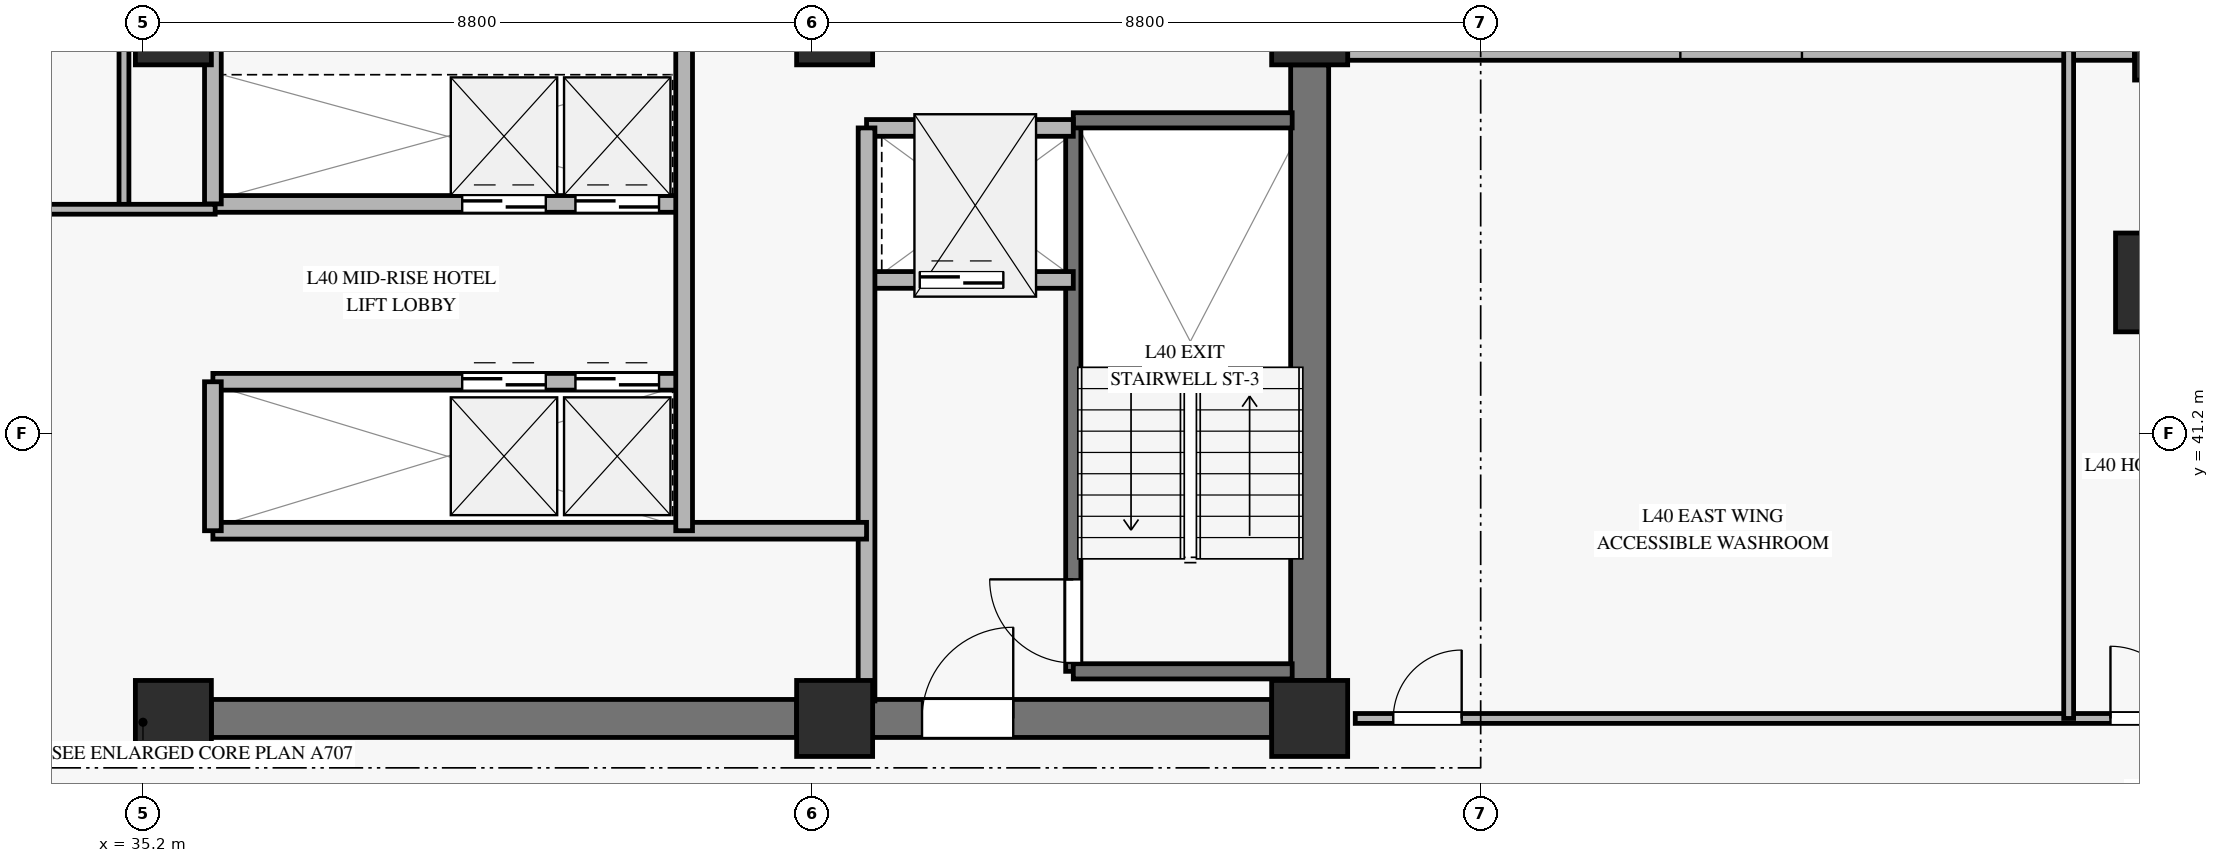
"""IFC4 building model, lengths in metres.
Left out: names, types, materials, properties, quantities, classifications, styles, units other than length and angle.
Written with IfcOpenShell. Run it as: python <this file> out.ifc"""

import sys

from ifc_helpers import new_model, si_unit, direction, frame, frame_2d, origin, origin_2d, place, context, subcontext, project, spatial, rectangle, hollow_rectangle, extrude, source, transform, mapped, element, fill, save


model = new_model("IFC4")
c1 = context("Model", 3, precision=1e-05, world=origin(), true_north=direction((0.0, 1.0)))
c2 = subcontext(c1, "Body", "Model", "MODEL_VIEW")
j1 = project(units=[si_unit("LENGTHUNIT", "METRE"), si_unit("PLANEANGLEUNIT", "RADIAN")], contexts=[c1])
p1 = place(None, origin())
s1 = spatial("IfcSite", under=j1, at=p1, CompositionType="ELEMENT")
p2 = place(p1, origin())
s2 = spatial("IfcBuilding", under=s1, at=p2, CompositionType="ELEMENT")
p3 = place(p2, frame((0.0, 0.0, 163.2)))
s3 = spatial("IfcBuildingStorey", under=s2, at=p3, CompositionType="ELEMENT", Elevation=163.2)
m1 = source(origin(), c2, "Body", "SweptSolid", [
    extrude(rectangle(XDim=1.0, YDim=1.0, at=origin_2d()), origin(), (0.0, 0.0, 1.0), 3.27),
])
for number, where, z_axis, x_axis in (
    (1, (35.6, 37.45, 0.0), (0.0, 0.0, 1.0), (1.0, 0.0, 0.0)),
    (2, (35.6, 46.55, 0.0), (0.0, 0.0, 1.0), (1.0, 0.0, 0.0)),
    (3, (44.3, 37.45, 0.0), (0.0, 0.0, 1.0), (1.0, 0.0, 0.0)),
    (4, (44.3, 46.55, 0.0), (0.0, 0.0, 1.0), (1.0, 0.0, 0.0)),
    (5, (50.55, 37.45, 0.0), (0.0, 0.0, 1.0), (1.0, 0.0, 0.0)),
    (6, (50.55, 46.55, 0.0), (0.0, 0.0, 1.0), (1.0, 0.0, 0.0)),
):
    element("IfcColumn", number, at=place(p3, frame(where, z_axis=z_axis, x_axis=x_axis)), inside=s3, PredefinedType="PILASTER", context=c2, shape_type="MappedRepresentation", body=[
        mapped(m1, transform((0.0, 0.0, 0.0), x_axis=(1.0, 0.0, 0.0), y_axis=(0.0, 1.0, 0.0), z_axis=(0.0, 0.0, 1.0), scale=1.0)),
    ])
p4 = place(p3, frame((36.1, 37.45, 0.0), z_axis=(0.0, 0.0, 1.0), x_axis=(1.0, 0.0, 0.0)))
e7 = element("IfcWall", 7, at=p4, inside=s3, PredefinedType="SHEAR", context=c2, shape_type="SweptSolid", body=[
    extrude(rectangle(XDim=7.7, YDim=0.5, at=frame_2d((3.85, 0.0))), origin(), (0.0, 0.0, 1.0), 3.27),
])
p5 = place(p3, frame((44.8, 37.45, 0.0), z_axis=(0.0, 0.0, 1.0), x_axis=(1.0, 0.0, 0.0)))
e8 = element("IfcWall", 8, at=p5, inside=s3, PredefinedType="SHEAR", context=c2, shape_type="SweptSolid", body=[
    extrude(rectangle(XDim=5.25, YDim=0.5, at=frame_2d((2.625, 0.0))), origin(), (0.0, 0.0, 1.0), 3.27),
])
p6 = place(p5, frame((0.65, 0.0, 0.0)))
e9 = element("IfcOpeningElement", 9, at=p6, cuts=e8, PredefinedType="OPENING", context=c2, shape_type="SweptSolid", body=[
    extrude(rectangle(XDim=1.2, YDim=2.15, at=frame_2d((0.6, 1.075))), frame((0.0, 0.26, 0.0), z_axis=(0.0, -1.0, 0.0), x_axis=(1.0, 0.0, 0.0)), (0.0, 0.0, 1.0), 0.52),
])
p7 = place(p3, frame((50.55, 37.95, 0.0), z_axis=(0.0, 0.0, 1.0), x_axis=(0.0, 1.0, 0.0)))
e10 = element("IfcWall", 10, at=p7, inside=s3, PredefinedType="SHEAR", context=c2, shape_type="SweptSolid", body=[
    extrude(rectangle(XDim=8.1, YDim=0.5, at=frame_2d((4.05, 0.0))), origin(), (0.0, 0.0, 1.0), 3.27),
])
m2 = source(origin(), c2, "Body", "SweptSolid", [
    extrude(hollow_rectangle(XDim=1.3, YDim=1.3, WallThickness=0.06, at=origin_2d()), origin(), (0.0, 0.0, 1.0), 3.27),
])
p8 = place(p3, frame((61.803, 43.187, 0.0), z_axis=(0.0, 0.0, 1.0), x_axis=(1.0, 0.0, 0.0)))
e11 = element("IfcColumn", 11, at=p8, inside=s3, PredefinedType="COLUMN", context=c2, shape_type="MappedRepresentation", body=[
    mapped(m2, transform((0.0, 0.0, 0.0), x_axis=(1.0, 0.0, 0.0), y_axis=(0.0, 1.0, 0.0), z_axis=(0.0, 0.0, 1.0), scale=1.0)),
])
m3 = source(origin(), c2, "Body", "SweptSolid", [
    extrude(hollow_rectangle(XDim=0.8, YDim=0.8, WallThickness=0.036, at=origin_2d()), origin(), (0.0, 0.0, 1.0), 3.27),
])
p9 = place(p3, frame((61.803, 46.25, 0.0), z_axis=(0.0, 0.0, 1.0), x_axis=(1.0, 0.0, 0.0)))
e12 = element("IfcColumn", 12, at=p9, inside=s3, PredefinedType="COLUMN", context=c2, shape_type="MappedRepresentation", body=[
    mapped(m3, transform((0.0, 0.0, 0.0), x_axis=(1.0, 0.0, 0.0), y_axis=(0.0, 1.0, 0.0), z_axis=(0.0, 0.0, 1.0), scale=1.0)),
])
p10 = place(p3, frame((51.05, 46.25, 0.0), z_axis=(0.0, 0.0, 1.0), x_axis=(1.0, 0.0, 0.0)))
e13 = element("IfcWall", 13, at=p10, inside=s3, PredefinedType="SOLIDWALL", context=c2, shape_type="SweptSolid", body=[
    extrude(rectangle(XDim=10.353, YDim=0.28, at=frame_2d((5.177, 0.0))), origin(), (0.0, 0.0, 1.0), 2.75),
])
p11 = place(p10, frame((4.377, 0.0, 0.45)))
e14 = element("IfcOpeningElement", 14, at=p11, cuts=e13, PredefinedType="OPENING", context=c2, shape_type="SweptSolid", body=[
    extrude(rectangle(XDim=1.6, YDim=2.0, at=frame_2d((0.8, 1.0))), frame((0.0, 0.15, 0.0), z_axis=(0.0, -1.0, 0.0), x_axis=(1.0, 0.0, 0.0)), (0.0, 0.0, 1.0), 0.3),
])
p12 = place(p3, frame((47.44, 38.07, 0.0), z_axis=(0.0, 0.0, 1.0), x_axis=(0.0, 1.0, 0.0)))
e15 = element("IfcWall", 15, at=p12, inside=s3, PredefinedType="SOLIDWALL", context=c2, shape_type="SweptSolid", body=[
    extrude(rectangle(XDim=7.25, YDim=0.2, at=frame_2d((3.625, 0.0))), origin(), (0.0, 0.0, 1.0), 3.5),
])
p13 = place(p12, frame((0.11, 0.0, 0.0)))
e16 = element("IfcOpeningElement", 16, at=p13, cuts=e15, PredefinedType="OPENING", context=c2, shape_type="SweptSolid", body=[
    extrude(rectangle(XDim=1.1, YDim=2.15, at=frame_2d((0.55, 1.075))), frame((0.0, 0.11, 0.0), z_axis=(0.0, -1.0, 0.0), x_axis=(1.0, 0.0, 0.0)), (0.0, 0.0, 1.0), 0.22),
])
for number, where, z_axis, x_axis in (
    (17, (47.44, 45.32, 0.0), (0.0, 0.0, 1.0), (1.0, 0.0, 0.0)),
    (18, (47.44, 38.07, 0.0), (0.0, 0.0, 1.0), (1.0, 0.0, 0.0)),
):
    element("IfcWall", number, at=place(p3, frame(where, z_axis=z_axis, x_axis=x_axis)), inside=s3, PredefinedType="SOLIDWALL", context=c2, shape_type="SweptSolid", body=[
        extrude(rectangle(XDim=2.88, YDim=0.2, at=frame_2d((1.44, 0.0))), origin(), (0.0, 0.0, 1.0), 3.5),
    ])
p14 = place(p3, frame((44.72, 43.22, 0.0), z_axis=(0.0, 0.0, 1.0), x_axis=(1.0, 0.0, 0.0)))
e19 = element("IfcWall", 19, at=p14, inside=s3, PredefinedType="SOLIDWALL", context=c2, shape_type="SweptSolid", body=[
    extrude(rectangle(XDim=2.72, YDim=0.22, at=frame_2d((1.36, 0.0))), origin(), (0.0, 0.0, 1.0), 3.27),
])
p15 = place(p14, frame((0.7, 0.0, 0.0)))
e20 = element("IfcOpeningElement", 20, at=p15, cuts=e19, PredefinedType="OPENING", context=c2, shape_type="SweptSolid", body=[
    extrude(rectangle(XDim=1.1, YDim=2.2, at=frame_2d((0.55, 1.1))), frame((0.0, 0.12, 0.0), z_axis=(0.0, -1.0, 0.0), x_axis=(1.0, 0.0, 0.0)), (0.0, 0.0, 1.0), 0.24),
])
p16 = place(p3, frame((44.72, 45.22, 0.0), z_axis=(0.0, 0.0, 1.0), x_axis=(1.0, 0.0, 0.0)))
e21 = element("IfcWall", 21, at=p16, inside=s3, PredefinedType="SOLIDWALL", context=c2, shape_type="SweptSolid", body=[
    extrude(rectangle(XDim=2.72, YDim=0.22, at=frame_2d((1.36, 0.0))), origin(), (0.0, 0.0, 1.0), 3.27),
])
p17 = place(p3, frame((44.72, 37.68, 0.0), z_axis=(0.0, 0.0, 1.0), x_axis=(0.0, 1.0, 0.0)))
e22 = element("IfcWall", 22, at=p17, inside=s3, PredefinedType="SOLIDWALL", context=c2, shape_type="SweptSolid", body=[
    extrude(rectangle(XDim=7.54, YDim=0.22, at=frame_2d((3.77, 0.0))), origin(), (0.0, 0.0, 1.0), 3.27),
])
p18 = place(p3, frame((36.12, 44.22, 0.0), z_axis=(0.0, 0.0, 1.0), x_axis=(1.0, 0.0, 0.0)))
e23 = element("IfcWall", 23, at=p18, inside=s3, PredefinedType="SOLIDWALL", context=c2, shape_type="SweptSolid", body=[
    extrude(rectangle(XDim=6.2, YDim=0.22, at=frame_2d((3.1, 0.0))), origin(), (0.0, 0.0, 1.0), 3.27),
])
p19 = place(p18, frame((3.28, 0.0, 0.0)))
e24 = element("IfcOpeningElement", 24, at=p19, cuts=e23, PredefinedType="OPENING", context=c2, shape_type="SweptSolid", body=[
    extrude(rectangle(XDim=1.1, YDim=2.2, at=frame_2d((0.55, 1.1))), frame((0.0, 0.12, 0.0), z_axis=(0.0, -1.0, 0.0), x_axis=(1.0, 0.0, 0.0)), (0.0, 0.0, 1.0), 0.24),
])
p20 = place(p18, frame((4.77, 0.0, 0.0)))
e25 = element("IfcOpeningElement", 25, at=p20, cuts=e23, PredefinedType="OPENING", context=c2, shape_type="SweptSolid", body=[
    extrude(rectangle(XDim=1.1, YDim=2.2, at=frame_2d((0.55, 1.1))), frame((0.0, 0.12, 0.0), z_axis=(0.0, -1.0, 0.0), x_axis=(1.0, 0.0, 0.0)), (0.0, 0.0, 1.0), 0.24),
])
p21 = place(p3, frame((36.12, 41.88, 0.0), z_axis=(0.0, 0.0, 1.0), x_axis=(1.0, 0.0, 0.0)))
e26 = element("IfcWall", 26, at=p21, inside=s3, PredefinedType="SOLIDWALL", context=c2, shape_type="SweptSolid", body=[
    extrude(rectangle(XDim=6.2, YDim=0.22, at=frame_2d((3.1, 0.0))), origin(), (0.0, 0.0, 1.0), 3.27),
])
p22 = place(p21, frame((3.28, 0.0, 0.0)))
e27 = element("IfcOpeningElement", 27, at=p22, cuts=e26, PredefinedType="OPENING", context=c2, shape_type="SweptSolid", body=[
    extrude(rectangle(XDim=1.1, YDim=2.2, at=frame_2d((0.55, 1.1))), frame((0.0, 0.12, 0.0), z_axis=(0.0, -1.0, 0.0), x_axis=(1.0, 0.0, 0.0)), (0.0, 0.0, 1.0), 0.24),
])
p23 = place(p21, frame((4.77, 0.0, 0.0)))
e28 = element("IfcOpeningElement", 28, at=p23, cuts=e26, PredefinedType="OPENING", context=c2, shape_type="SweptSolid", body=[
    extrude(rectangle(XDim=1.1, YDim=2.2, at=frame_2d((0.55, 1.1))), frame((0.0, 0.12, 0.0), z_axis=(0.0, -1.0, 0.0), x_axis=(1.0, 0.0, 0.0)), (0.0, 0.0, 1.0), 0.24),
])
p24 = place(p3, frame((36.12, 39.92, 0.0), z_axis=(0.0, 0.0, 1.0), x_axis=(1.0, 0.0, 0.0)))
e29 = element("IfcWall", 29, at=p24, inside=s3, PredefinedType="SOLIDWALL", context=c2, shape_type="SweptSolid", body=[
    extrude(rectangle(XDim=8.6, YDim=0.22, at=frame_2d((4.3, 0.0))), origin(), (0.0, 0.0, 1.0), 2.555),
])
p25 = place(p3, frame((42.32, 39.92, 0.0), z_axis=(0.0, 0.0, 1.0), x_axis=(0.0, 1.0, 0.0)))
e30 = element("IfcWall", 30, at=p25, inside=s3, PredefinedType="SOLIDWALL", context=c2, shape_type="SweptSolid", body=[
    extrude(rectangle(XDim=6.4, YDim=0.22, at=frame_2d((3.2, 0.0))), origin(), (0.0, 0.0, 1.0), 3.27),
])
p26 = place(p3, frame((36.12, 39.92, 0.0), z_axis=(0.0, 0.0, 1.0), x_axis=(0.0, 1.0, 0.0)))
e31 = element("IfcWall", 31, at=p26, inside=s3, PredefinedType="SOLIDWALL", context=c2, shape_type="SweptSolid", body=[
    extrude(rectangle(XDim=1.96, YDim=0.22, at=frame_2d((0.98, 0.0))), origin(), (0.0, 0.0, 1.0), 3.27),
])
p27 = place(p3, frame((36.12, 44.22, 0.0), z_axis=(0.0, 0.0, 1.0), x_axis=(0.0, 1.0, 0.0)))
e32 = element("IfcWall", 32, at=p27, inside=s3, PredefinedType="SOLIDWALL", context=c2, shape_type="SweptSolid", body=[
    extrude(rectangle(XDim=2.1, YDim=0.22, at=frame_2d((1.05, 0.0))), origin(), (0.0, 0.0, 1.0), 3.27),
])
p28 = place(p3, frame((34.95, 44.15, 0.0), z_axis=(0.0, 0.0, 1.0), x_axis=(0.0, 1.0, 0.0)))
e33 = element("IfcWall", 33, at=p28, inside=s3, PredefinedType="PARTITIONING", context=c2, shape_type="SweptSolid", body=[
    extrude(rectangle(XDim=2.17, YDim=0.13, at=frame_2d((1.085, 0.0))), origin(), (0.0, 0.0, 1.0), 3.27),
])
p29 = place(p3, frame((33.18, 44.15, 0.0), z_axis=(0.0, 0.0, 1.0), x_axis=(1.0, 0.0, 0.0)))
e34 = element("IfcWall", 34, at=p29, inside=s3, PredefinedType="PARTITIONING", context=c2, shape_type="SweptSolid", body=[
    extrude(rectangle(XDim=2.97, YDim=0.13, at=frame_2d((1.485, 0.0))), origin(), (0.0, 0.0, 1.0), 2.555),
])
p30 = place(p3, frame((51.15, 37.45, 0.0), z_axis=(0.0, 0.0, 1.0), x_axis=(1.0, 0.0, 0.0)))
e35 = element("IfcWall", 35, at=p30, inside=s3, PredefinedType="PARTITIONING", context=c2, shape_type="SweptSolid", body=[
    extrude(rectangle(XDim=13.566, YDim=0.13, at=frame_2d((6.783, 0.0))), origin(), (0.0, 0.0, 1.0), 2.755),
])
p31 = place(p30, frame((0.5, 0.0, 0.0)))
e36 = element("IfcOpeningElement", 36, at=p31, cuts=e35, PredefinedType="OPENING", context=c2, shape_type="SweptSolid", body=[
    extrude(rectangle(XDim=0.9, YDim=2.1, at=frame_2d((0.45, 1.05))), frame((0.0, 0.075, 0.0), z_axis=(0.0, -1.0, 0.0), x_axis=(1.0, 0.0, 0.0)), (0.0, 0.0, 1.0), 0.15),
])
p32 = place(p30, frame((9.936, 0.0, 0.0)))
e37 = element("IfcOpeningElement", 37, at=p32, cuts=e35, PredefinedType="OPENING", context=c2, shape_type="SweptSolid", body=[
    extrude(rectangle(XDim=0.95, YDim=2.1, at=frame_2d((0.475, 1.05))), frame((0.0, 0.075, 0.0), z_axis=(0.0, -1.0, 0.0), x_axis=(1.0, 0.0, 0.0)), (0.0, 0.0, 1.0), 0.15),
])
p33 = place(p3, frame((60.536, 37.45, 0.0), z_axis=(0.0, 0.0, 1.0), x_axis=(0.0, 1.0, 0.0)))
e38 = element("IfcWall", 38, at=p33, inside=s3, PredefinedType="PARTITIONING", context=c2, shape_type="SweptSolid", body=[
    extrude(rectangle(XDim=8.8, YDim=0.13, at=frame_2d((4.4, 0.0))), origin(), (0.0, 0.0, 1.0), 3.27),
])
m4 = source(origin(), c2, "Body", "SweptSolid", [
    extrude(rectangle(XDim=1.1, YDim=2.15, at=frame_2d((0.55, 1.075))), frame((0.0, 0.025, 0.0), z_axis=(0.0, -1.0, 0.0), x_axis=(1.0, 0.0, 0.0)), (0.0, 0.0, 1.0), 0.05),
])
p34 = place(p13, origin())
e39 = element("IfcDoor", 39, at=p34, inside=s3, OperationType="SINGLE_SWING_RIGHT", PredefinedType="DOOR", context=c2, shape_type="MappedRepresentation", body=[
    mapped(m4, transform((0.0, 0.0, 0.0), x_axis=(1.0, 0.0, 0.0), y_axis=(0.0, 1.0, 0.0), z_axis=(0.0, 0.0, 1.0), scale=1.0)),
])
fill(e16, e39)
m5 = source(origin(), c2, "Body", "SweptSolid", [
    extrude(rectangle(XDim=1.1, YDim=2.2, at=frame_2d((0.55, 1.1))), frame((0.0, 0.025, 0.0), z_axis=(0.0, -1.0, 0.0), x_axis=(1.0, 0.0, 0.0)), (0.0, 0.0, 1.0), 0.05),
])
p35 = place(p15, origin())
e40 = element("IfcDoor", 40, at=p35, inside=s3, OperationType="SLIDING_TO_LEFT", PredefinedType="DOOR", context=c2, shape_type="MappedRepresentation", body=[
    mapped(m5, transform((0.0, 0.0, 0.0), x_axis=(1.0, 0.0, 0.0), y_axis=(0.0, 1.0, 0.0), z_axis=(0.0, 0.0, 1.0), scale=1.0)),
])
fill(e20, e40)
m6 = source(origin(), c2, "Body", "SweptSolid", [
    extrude(rectangle(XDim=1.2, YDim=2.15, at=frame_2d((0.6, 1.075))), frame((0.0, 0.025, 0.0), z_axis=(0.0, -1.0, 0.0), x_axis=(1.0, 0.0, 0.0)), (0.0, 0.0, 1.0), 0.05),
])
p36 = place(p6, origin())
e41 = element("IfcDoor", 41, at=p36, inside=s3, OperationType="SINGLE_SWING_RIGHT", PredefinedType="DOOR", context=c2, shape_type="MappedRepresentation", body=[
    mapped(m6, transform((0.0, 0.0, 0.0), x_axis=(1.0, 0.0, 0.0), y_axis=(0.0, 1.0, 0.0), z_axis=(0.0, 0.0, 1.0), scale=1.0)),
])
fill(e9, e41)
p37 = place(p19, origin())
e42 = element("IfcDoor", 42, at=p37, inside=s3, OperationType="SLIDING_TO_LEFT", PredefinedType="DOOR", context=c2, shape_type="MappedRepresentation", body=[
    mapped(m5, transform((0.0, 0.0, 0.0), x_axis=(1.0, 0.0, 0.0), y_axis=(0.0, 1.0, 0.0), z_axis=(0.0, 0.0, 1.0), scale=1.0)),
])
fill(e24, e42)
p38 = place(p20, origin())
e43 = element("IfcDoor", 43, at=p38, inside=s3, OperationType="SLIDING_TO_LEFT", PredefinedType="DOOR", context=c2, shape_type="MappedRepresentation", body=[
    mapped(m5, transform((0.0, 0.0, 0.0), x_axis=(1.0, 0.0, 0.0), y_axis=(0.0, 1.0, 0.0), z_axis=(0.0, 0.0, 1.0), scale=1.0)),
])
fill(e25, e43)
p39 = place(p22, origin())
e44 = element("IfcDoor", 44, at=p39, inside=s3, OperationType="SLIDING_TO_LEFT", PredefinedType="DOOR", context=c2, shape_type="MappedRepresentation", body=[
    mapped(m5, transform((0.0, 0.0, 0.0), x_axis=(1.0, 0.0, 0.0), y_axis=(0.0, 1.0, 0.0), z_axis=(0.0, 0.0, 1.0), scale=1.0)),
])
fill(e27, e44)
p40 = place(p23, origin())
e45 = element("IfcDoor", 45, at=p40, inside=s3, OperationType="SLIDING_TO_LEFT", PredefinedType="DOOR", context=c2, shape_type="MappedRepresentation", body=[
    mapped(m5, transform((0.0, 0.0, 0.0), x_axis=(1.0, 0.0, 0.0), y_axis=(0.0, 1.0, 0.0), z_axis=(0.0, 0.0, 1.0), scale=1.0)),
])
fill(e28, e45)
m7 = source(origin(), c2, "Body", "SweptSolid", [
    extrude(rectangle(XDim=0.9, YDim=2.1, at=frame_2d((0.45, 1.05))), frame((0.0, 0.025, 0.0), z_axis=(0.0, -1.0, 0.0), x_axis=(1.0, 0.0, 0.0)), (0.0, 0.0, 1.0), 0.05),
])
p41 = place(p31, origin())
e46 = element("IfcDoor", 46, at=p41, inside=s3, OperationType="SINGLE_SWING_RIGHT", PredefinedType="DOOR", context=c2, shape_type="MappedRepresentation", body=[
    mapped(m7, transform((0.0, 0.0, 0.0), x_axis=(1.0, 0.0, 0.0), y_axis=(0.0, 1.0, 0.0), z_axis=(0.0, 0.0, 1.0), scale=1.0)),
])
fill(e36, e46)
m8 = source(origin(), c2, "Body", "SweptSolid", [
    extrude(rectangle(XDim=0.95, YDim=2.1, at=frame_2d((0.475, 1.05))), frame((0.0, 0.025, 0.0), z_axis=(0.0, -1.0, 0.0), x_axis=(1.0, 0.0, 0.0)), (0.0, 0.0, 1.0), 0.05),
])
p42 = place(p32, origin())
e47 = element("IfcDoor", 47, at=p42, inside=s3, OperationType="SINGLE_SWING_LEFT", PredefinedType="DOOR", context=c2, shape_type="MappedRepresentation", body=[
    mapped(m8, transform((0.0, 0.0, 0.0), x_axis=(1.0, 0.0, 0.0), y_axis=(0.0, 1.0, 0.0), z_axis=(0.0, 0.0, 1.0), scale=1.0)),
])
fill(e37, e47)
save(model, sys.argv[1])
